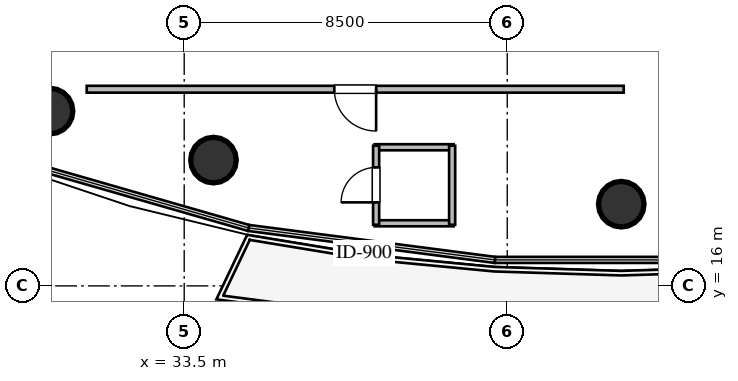
"""IFC4 building model, lengths in metres.
Left out: names, types, materials, properties, quantities, classifications, styles, units other than length and angle.
Written with IfcOpenShell. Run it as: python <this file> out.ifc"""

import sys

from ifc_helpers import new_model, si_unit, direction, frame, frame_2d, origin, origin_2d, place, context, subcontext, project, spatial, rectangle, circle, extrude, element, fill, save


model = new_model("IFC4")
c1 = context("Model", 3, precision=1e-05, world=origin(), true_north=direction((0.0, 1.0)))
c2 = subcontext(c1, "Body", "Model", "MODEL_VIEW")
j1 = project(units=[si_unit("LENGTHUNIT", "METRE"), si_unit("PLANEANGLEUNIT", "RADIAN")], contexts=[c1])
p1 = place(None, origin())
s1 = spatial("IfcSite", under=j1, at=p1, CompositionType="ELEMENT")
p2 = place(p1, origin())
s2 = spatial("IfcBuilding", under=s1, at=p2, CompositionType="ELEMENT")
p3 = place(p2, frame((0.0, 0.0, 142.2)))
s3 = spatial("IfcBuildingStorey", under=s2, at=p3, CompositionType="ELEMENT", Elevation=142.2)
for number, where, z_axis, x_axis in (
    (1, (29.97, 20.6, 0.0), (0.0, 0.0, 1.0), (1.0, 0.0, 0.0)),
    (2, (34.27, 19.31, 0.0), (0.0, 0.0, 1.0), (1.0, 0.0, 0.0)),
    (3, (45.0, 18.15, 0.0), (0.0, 0.0, 1.0), (1.0, 0.0, 0.0)),
):
    element("IfcColumn", number, at=place(p3, frame(where, z_axis=z_axis, x_axis=x_axis)), inside=s3, PredefinedType="COLUMN", context=c2, shape_type="SweptSolid", body=[
        extrude(circle(Radius=0.6, at=origin_2d()), origin(), (0.0, 0.0, 1.0), 3.6),
    ])
for number, where, z_axis, x_axis in (
    (4, (38.51, 17.648, 0.0), (0.0, 0.0, 1.0), (1.0, 0.0, 0.0)),
    (5, (38.51, 19.648, 0.0), (0.0, 0.0, 1.0), (1.0, 0.0, 0.0)),
):
    element("IfcWall", number, at=place(p3, frame(where, z_axis=z_axis, x_axis=x_axis)), inside=s3, PredefinedType="PLUMBINGWALL", context=c2, shape_type="SweptSolid", body=[
        extrude(rectangle(XDim=2.08, YDim=0.16, at=frame_2d((1.04, 0.0))), origin(), (0.0, 0.0, 1.0), 3.36),
    ])
p4 = place(p3, frame((38.55, 17.608, 0.0), z_axis=(0.0, 0.0, 1.0), x_axis=(0.0, 1.0, 0.0)))
e6 = element("IfcWall", 6, at=p4, inside=s3, PredefinedType="PLUMBINGWALL", context=c2, shape_type="SweptSolid", body=[
    extrude(rectangle(XDim=2.08, YDim=0.16, at=frame_2d((1.04, 0.0))), origin(), (0.0, 0.0, 1.0), 3.36),
])
p5 = place(p4, frame((0.59, 0.0, 0.0)))
e7 = element("IfcOpeningElement", 7, at=p5, cuts=e6, PredefinedType="OPENING", context=c2, shape_type="SweptSolid", body=[
    extrude(rectangle(XDim=0.92, YDim=2.1, at=frame_2d((0.46, 1.05))), frame((0.0, 0.09, 0.0), z_axis=(0.0, -1.0, 0.0), x_axis=(1.0, 0.0, 0.0)), (0.0, 0.0, 1.0), 0.18),
])
p6 = place(p3, frame((40.55, 17.608, 0.0), z_axis=(0.0, 0.0, 1.0), x_axis=(0.0, 1.0, 0.0)))
e8 = element("IfcWall", 8, at=p6, inside=s3, PredefinedType="PLUMBINGWALL", context=c2, shape_type="SweptSolid", body=[
    extrude(rectangle(XDim=2.08, YDim=0.16, at=frame_2d((1.04, 0.0))), origin(), (0.0, 0.0, 1.0), 3.36),
])
p7 = place(p3, frame((45.065, 21.175, 0.0), z_axis=(0.0, 0.0, 1.0), x_axis=(-1.0, 0.0, 0.0)))
e9 = element("IfcWall", 9, at=p7, inside=s3, PredefinedType="PARTITIONING", context=c2, shape_type="SweptSolid", body=[
    extrude(rectangle(XDim=14.13, YDim=0.18, at=frame_2d((7.065, 0.0))), origin(), (0.0, 0.0, 1.0), 2.996),
])
p8 = place(p7, frame((6.515, 0.0, 0.0)))
e10 = element("IfcOpeningElement", 10, at=p8, cuts=e9, PredefinedType="OPENING", context=c2, shape_type="SweptSolid", body=[
    extrude(rectangle(XDim=1.1, YDim=2.1, at=frame_2d((0.55, 1.05))), frame((0.0, 0.1, 0.0), z_axis=(0.0, -1.0, 0.0), x_axis=(1.0, 0.0, 0.0)), (0.0, 0.0, 1.0), 0.2),
])
p9 = place(p5, origin())
e11 = element("IfcDoor", 11, at=p9, inside=s3, OperationType="SINGLE_SWING_LEFT", PredefinedType="DOOR", context=c2, shape_type="SweptSolid", body=[
    extrude(rectangle(XDim=0.92, YDim=2.1, at=frame_2d((0.46, 1.05))), frame((0.0, 0.025, 0.0), z_axis=(0.0, -1.0, 0.0), x_axis=(1.0, 0.0, 0.0)), (0.0, 0.0, 1.0), 0.05),
])
fill(e7, e11)
p10 = place(p8, origin())
e12 = element("IfcDoor", 12, at=p10, inside=s3, OperationType="SINGLE_SWING_LEFT", PredefinedType="DOOR", context=c2, shape_type="SweptSolid", body=[
    extrude(rectangle(XDim=1.1, YDim=2.1, at=frame_2d((0.55, 1.05))), frame((0.0, 0.025, 0.0), z_axis=(0.0, -1.0, 0.0), x_axis=(1.0, 0.0, 0.0)), (0.0, 0.0, 1.0), 0.05),
])
fill(e10, e12)
save(model, sys.argv[1])
